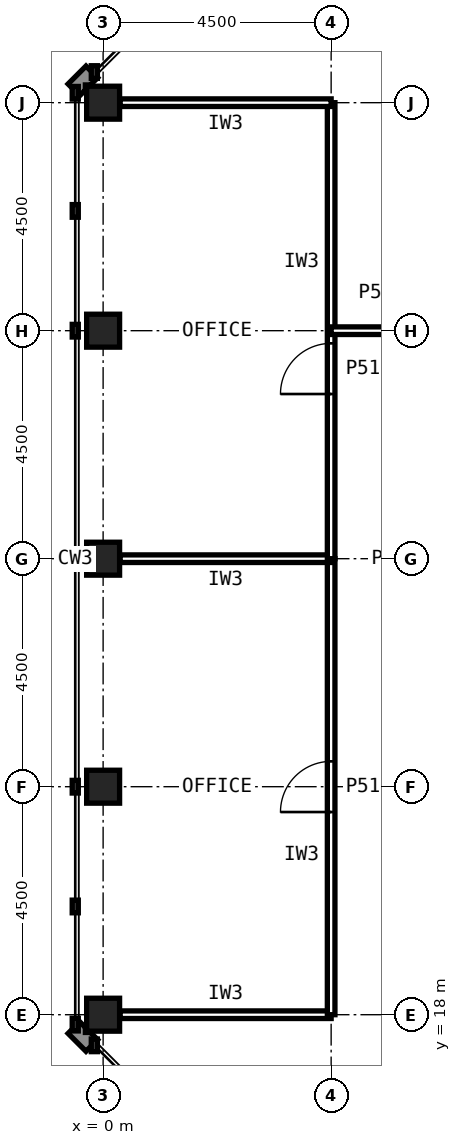
"""IFC4 building model, lengths in metres.
Left out: names, types, materials, properties, quantities, classifications, styles, units other than length and angle.
Written with IfcOpenShell. Run it as: python <this file> out.ifc"""

import sys

from ifc_helpers import new_model, si_unit, direction, frame, frame_2d, origin, origin_2d, place, context, subcontext, project, spatial, rectangle, hollow_rectangle, extrude, element, fill, save


model = new_model("IFC4")
c1 = context("Model", 3, precision=1e-05, world=origin(), true_north=direction((0.0, 1.0)))
c2 = subcontext(c1, "Body", "Model", "MODEL_VIEW")
j1 = project(units=[si_unit("LENGTHUNIT", "METRE"), si_unit("PLANEANGLEUNIT", "RADIAN")], contexts=[c1])
p1 = place(None, origin())
s1 = spatial("IfcSite", under=j1, at=p1, CompositionType="ELEMENT")
p2 = place(p1, origin())
s2 = spatial("IfcBuilding", under=s1, at=p2, CompositionType="ELEMENT")
p3 = place(p2, frame((0.0, 0.0, 214.6)))
s3 = spatial("IfcBuildingStorey", under=s2, at=p3, CompositionType="ELEMENT", Elevation=214.6)
for number, where, z_axis, x_axis in (
    (1, (0.0, 36.0, 0.0), (0.0, 0.0, 1.0), (1.0, 0.0, 0.0)),
    (2, (0.0, 31.5, 0.0), (0.0, 0.0, 1.0), (1.0, 0.0, 0.0)),
    (3, (0.0, 27.0, 0.0), (0.0, 0.0, 1.0), (1.0, 0.0, 0.0)),
    (4, (0.0, 22.5, 0.0), (0.0, 0.0, 1.0), (1.0, 0.0, 0.0)),
    (5, (0.0, 18.0, 0.0), (0.0, 0.0, 1.0), (1.0, 0.0, 0.0)),
):
    element("IfcColumn", number, at=place(p3, frame(where, z_axis=z_axis, x_axis=x_axis)), inside=s3, PredefinedType="COLUMN", context=c2, shape_type="SweptSolid", body=[
        extrude(hollow_rectangle(XDim=0.65, YDim=0.65, WallThickness=0.032, at=origin_2d()), origin(), (0.0, 0.0, 1.0), 4.0),
    ])
p4 = place(p3, frame((0.335, 18.0, 0.0), z_axis=(0.0, 0.0, 1.0), x_axis=(1.0, 0.0, 0.0)))
e6 = element("IfcWall", 6, at=p4, inside=s3, PredefinedType="PARTITIONING", context=c2, shape_type="SweptSolid", body=[
    extrude(rectangle(XDim=4.165, YDim=0.15, at=frame_2d((2.083, 0.0))), origin(), (0.0, 0.0, 1.0), 2.989),
])
p5 = place(p3, frame((4.5, 18.0, 0.0), z_axis=(0.0, 0.0, 1.0), x_axis=(0.0, 1.0, 0.0)))
e7 = element("IfcWall", 7, at=p5, inside=s3, PredefinedType="PARTITIONING", context=c2, shape_type="SweptSolid", body=[
    extrude(rectangle(XDim=9.0, YDim=0.15, at=frame_2d((4.5, 0.0))), origin(), (0.0, 0.0, 1.0), 3.84),
])
p6 = place(p5, frame((4.0, 0.0, 0.0)))
e8 = element("IfcOpeningElement", 8, at=p6, cuts=e7, PredefinedType="OPENING", context=c2, shape_type="SweptSolid", body=[
    extrude(rectangle(XDim=1.0, YDim=2.1, at=frame_2d((0.5, 1.05))), frame((0.0, 0.085, 0.0), z_axis=(0.0, -1.0, 0.0), x_axis=(1.0, 0.0, 0.0)), (0.0, 0.0, 1.0), 0.17),
])
p7 = place(p3, frame((4.5, 27.0, 0.0), z_axis=(0.0, 0.0, 1.0), x_axis=(-1.0, 0.0, 0.0)))
e9 = element("IfcWall", 9, at=p7, inside=s3, PredefinedType="PARTITIONING", context=c2, shape_type="SweptSolid", body=[
    extrude(rectangle(XDim=4.165, YDim=0.15, at=frame_2d((2.083, 0.0))), origin(), (0.0, 0.0, 1.0), 2.989),
])
p8 = place(p3, frame((4.5, 27.0, 0.0), z_axis=(0.0, 0.0, 1.0), x_axis=(0.0, 1.0, 0.0)))
e10 = element("IfcWall", 10, at=p8, inside=s3, PredefinedType="PARTITIONING", context=c2, shape_type="SweptSolid", body=[
    extrude(rectangle(XDim=9.0, YDim=0.15, at=frame_2d((4.5, 0.0))), origin(), (0.0, 0.0, 1.0), 3.84),
])
p9 = place(p8, frame((3.25, 0.0, 0.0)))
e11 = element("IfcOpeningElement", 11, at=p9, cuts=e10, PredefinedType="OPENING", context=c2, shape_type="SweptSolid", body=[
    extrude(rectangle(XDim=1.0, YDim=2.1, at=frame_2d((0.5, 1.05))), frame((0.0, 0.085, 0.0), z_axis=(0.0, -1.0, 0.0), x_axis=(1.0, 0.0, 0.0)), (0.0, 0.0, 1.0), 0.17),
])
p10 = place(p3, frame((4.5, 36.0, 0.0), z_axis=(0.0, 0.0, 1.0), x_axis=(-1.0, 0.0, 0.0)))
e12 = element("IfcWall", 12, at=p10, inside=s3, PredefinedType="PARTITIONING", context=c2, shape_type="SweptSolid", body=[
    extrude(rectangle(XDim=4.165, YDim=0.15, at=frame_2d((2.083, 0.0))), origin(), (0.0, 0.0, 1.0), 2.989),
])
p11 = place(p3, frame((4.5, 31.5, 0.0), z_axis=(0.0, 0.0, 1.0), x_axis=(1.0, 0.0, 0.0)))
e13 = element("IfcWall", 13, at=p11, inside=s3, PredefinedType="PARTITIONING", context=c2, shape_type="SweptSolid", body=[
    extrude(rectangle(XDim=3.6, YDim=0.15, at=frame_2d((1.8, 0.0))), origin(), (0.0, 0.0, 1.0), 2.989),
])
p12 = place(p11, frame((1.3, 0.0, 0.0)))
e14 = element("IfcOpeningElement", 14, at=p12, cuts=e13, PredefinedType="OPENING", context=c2, shape_type="SweptSolid", body=[
    extrude(rectangle(XDim=1.0, YDim=2.1, at=frame_2d((0.5, 1.05))), frame((0.0, 0.085, 0.0), z_axis=(0.0, -1.0, 0.0), x_axis=(1.0, 0.0, 0.0)), (0.0, 0.0, 1.0), 0.17),
])
p13 = place(p6, origin())
e15 = element("IfcDoor", 15, at=p13, inside=s3, OperationType="SINGLE_SWING_LEFT", PredefinedType="DOOR", context=c2, shape_type="SweptSolid", body=[
    extrude(rectangle(XDim=1.0, YDim=2.1, at=frame_2d((0.5, 1.05))), frame((0.0, 0.025, 0.0), z_axis=(0.0, -1.0, 0.0), x_axis=(1.0, 0.0, 0.0)), (0.0, 0.0, 1.0), 0.05),
])
fill(e8, e15)
p14 = place(p9, origin())
e16 = element("IfcDoor", 16, at=p14, inside=s3, OperationType="SINGLE_SWING_LEFT", PredefinedType="DOOR", context=c2, shape_type="SweptSolid", body=[
    extrude(rectangle(XDim=1.0, YDim=2.1, at=frame_2d((0.5, 1.05))), frame((0.0, 0.025, 0.0), z_axis=(0.0, -1.0, 0.0), x_axis=(1.0, 0.0, 0.0)), (0.0, 0.0, 1.0), 0.05),
])
fill(e11, e16)
save(model, sys.argv[1])
